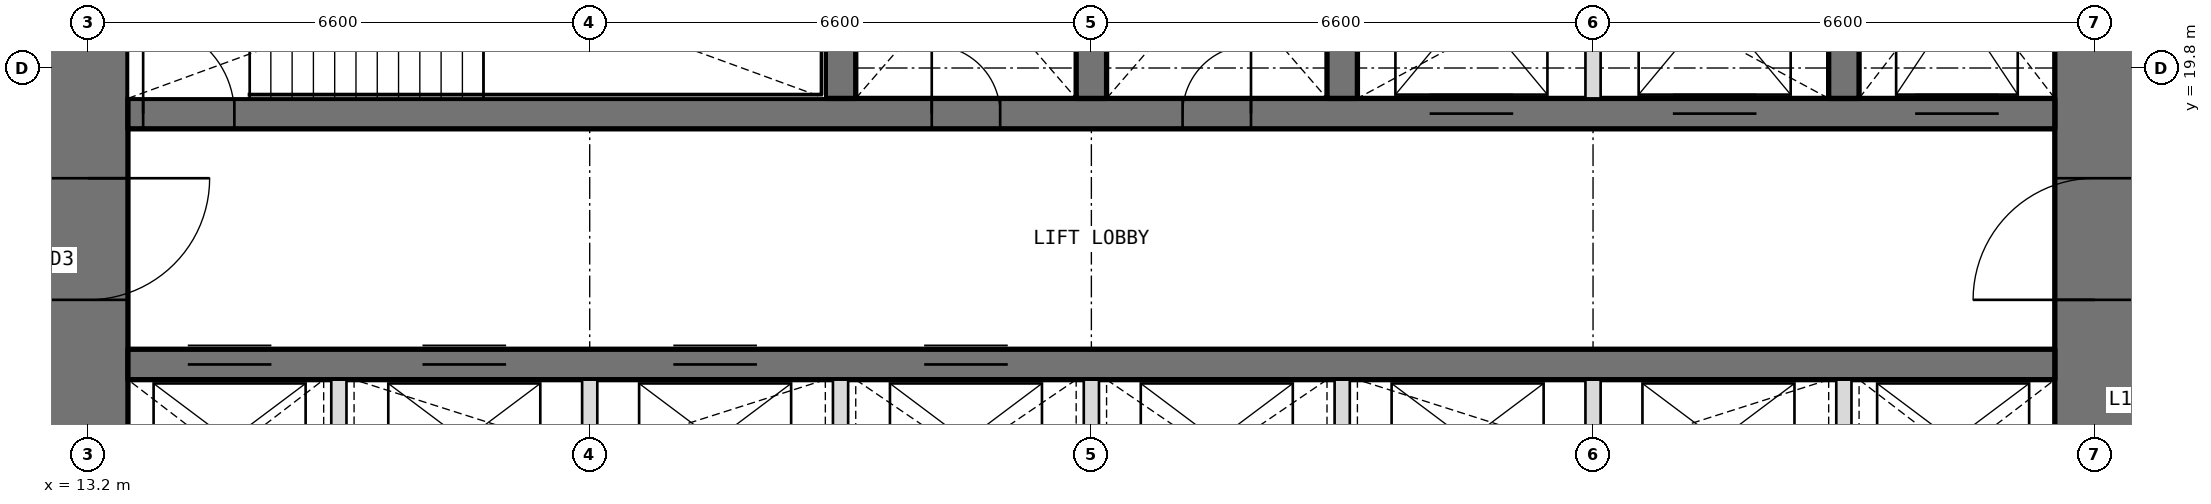
"""IFC4 building model, lengths in metres.
Left out: names, types, materials, properties, quantities, classifications, styles, units other than length and angle.
Written with IfcOpenShell. Run it as: python <this file> out.ifc"""

import sys

from ifc_helpers import new_model, si_unit, direction, frame, frame_2d, origin, place, context, subcontext, project, spatial, rectangle, extrude, element, fill, save


model = new_model("IFC4")
c1 = context("Model", 3, precision=1e-05, world=origin(), true_north=direction((0.0, 1.0)))
c2 = subcontext(c1, "Body", "Model", "MODEL_VIEW")
j1 = project(units=[si_unit("LENGTHUNIT", "METRE"), si_unit("PLANEANGLEUNIT", "RADIAN")], contexts=[c1])
p1 = place(None, origin())
s1 = spatial("IfcSite", under=j1, at=p1, CompositionType="ELEMENT")
p2 = place(p1, origin())
s2 = spatial("IfcBuilding", under=s1, at=p2, CompositionType="ELEMENT")
p3 = place(p2, frame((0.0, 0.0, 67.5)))
s3 = spatial("IfcBuildingStorey", under=s2, at=p3, CompositionType="ELEMENT", Elevation=67.5)
p4 = place(p3, frame((39.6, 13.725, 0.0), z_axis=(0.0, 0.0, 1.0), x_axis=(0.0, 1.0, 0.0)))
e1 = element("IfcWall", 1, at=p4, inside=s3, PredefinedType="SHEAR", context=c2, shape_type="SweptSolid", body=[
    extrude(rectangle(XDim=18.75, YDim=1.05, at=frame_2d((9.375, 0.0))), origin(), (0.0, 0.0, 1.0), 4.2),
])
p5 = place(p4, frame((3.025, 0.0, 0.0)))
e2 = element("IfcOpeningElement", 2, at=p5, cuts=e1, PredefinedType="OPENING", context=c2, shape_type="SweptSolid", body=[
    extrude(rectangle(XDim=1.6, YDim=2.1, at=frame_2d((0.8, 1.05))), frame((0.0, 0.535, 0.0), z_axis=(0.0, -1.0, 0.0), x_axis=(1.0, 0.0, 0.0)), (0.0, 0.0, 1.0), 1.07),
])
p6 = place(p4, frame((13.825, 0.0, 0.0)))
e3 = element("IfcOpeningElement", 3, at=p6, cuts=e1, PredefinedType="OPENING", context=c2, shape_type="SweptSolid", body=[
    extrude(rectangle(XDim=1.6, YDim=2.1, at=frame_2d((0.8, 1.05))), frame((0.0, 0.535, 0.0), z_axis=(0.0, -1.0, 0.0), x_axis=(1.0, 0.0, 0.0)), (0.0, 0.0, 1.0), 1.07),
])
p7 = place(p3, frame((13.2, 32.475, 0.0), z_axis=(0.0, 0.0, 1.0), x_axis=(0.0, -1.0, 0.0)))
e4 = element("IfcWall", 4, at=p7, inside=s3, PredefinedType="SHEAR", context=c2, shape_type="SweptSolid", body=[
    extrude(rectangle(XDim=18.75, YDim=1.05, at=frame_2d((9.375, 0.0))), origin(), (0.0, 0.0, 1.0), 4.2),
])
p8 = place(p7, frame((14.125, 0.0, 0.0)))
e5 = element("IfcOpeningElement", 5, at=p8, cuts=e4, PredefinedType="OPENING", context=c2, shape_type="SweptSolid", body=[
    extrude(rectangle(XDim=1.6, YDim=2.1, at=frame_2d((0.8, 1.05))), frame((0.0, 0.535, 0.0), z_axis=(0.0, -1.0, 0.0), x_axis=(1.0, 0.0, 0.0)), (0.0, 0.0, 1.0), 1.07),
])
p9 = place(p7, frame((3.325, 0.0, 0.0)))
e6 = element("IfcOpeningElement", 6, at=p9, cuts=e4, PredefinedType="OPENING", context=c2, shape_type="SweptSolid", body=[
    extrude(rectangle(XDim=1.6, YDim=2.1, at=frame_2d((0.8, 1.05))), frame((0.0, 0.535, 0.0), z_axis=(0.0, -1.0, 0.0), x_axis=(1.0, 0.0, 0.0)), (0.0, 0.0, 1.0), 1.07),
])
p10 = place(p3, frame((13.725, 15.9, 0.0), z_axis=(0.0, 0.0, 1.0), x_axis=(1.0, 0.0, 0.0)))
e7 = element("IfcWall", 7, at=p10, inside=s3, PredefinedType="SHEAR", context=c2, shape_type="SweptSolid", body=[
    extrude(rectangle(XDim=25.35, YDim=0.4, at=frame_2d((12.675, 0.0))), origin(), (0.0, 0.0, 1.0), 4.2),
])
p11 = place(p10, frame((0.788, 0.0, 0.0)))
e8 = element("IfcOpeningElement", 8, at=p11, cuts=e7, PredefinedType="OPENING", context=c2, shape_type="SweptSolid", body=[
    extrude(rectangle(XDim=1.1, YDim=2.1, at=frame_2d((0.55, 1.05))), frame((0.0, 0.21, 0.0), z_axis=(0.0, -1.0, 0.0), x_axis=(1.0, 0.0, 0.0)), (0.0, 0.0, 1.0), 0.42),
])
p12 = place(p10, frame((3.875, 0.0, 0.0)))
e9 = element("IfcOpeningElement", 9, at=p12, cuts=e7, PredefinedType="OPENING", context=c2, shape_type="SweptSolid", body=[
    extrude(rectangle(XDim=1.1, YDim=2.1, at=frame_2d((0.55, 1.05))), frame((0.0, 0.21, 0.0), z_axis=(0.0, -1.0, 0.0), x_axis=(1.0, 0.0, 0.0)), (0.0, 0.0, 1.0), 0.42),
])
p13 = place(p10, frame((7.175, 0.0, 0.0)))
e10 = element("IfcOpeningElement", 10, at=p13, cuts=e7, PredefinedType="OPENING", context=c2, shape_type="SweptSolid", body=[
    extrude(rectangle(XDim=1.1, YDim=2.1, at=frame_2d((0.55, 1.05))), frame((0.0, 0.21, 0.0), z_axis=(0.0, -1.0, 0.0), x_axis=(1.0, 0.0, 0.0)), (0.0, 0.0, 1.0), 0.42),
])
p14 = place(p10, frame((10.475, 0.0, 0.0)))
e11 = element("IfcOpeningElement", 11, at=p14, cuts=e7, PredefinedType="OPENING", context=c2, shape_type="SweptSolid", body=[
    extrude(rectangle(XDim=1.1, YDim=2.1, at=frame_2d((0.55, 1.05))), frame((0.0, 0.21, 0.0), z_axis=(0.0, -1.0, 0.0), x_axis=(1.0, 0.0, 0.0)), (0.0, 0.0, 1.0), 0.42),
])
p15 = place(p3, frame((13.725, 19.2, 0.0), z_axis=(0.0, 0.0, 1.0), x_axis=(1.0, 0.0, 0.0)))
e12 = element("IfcWall", 12, at=p15, inside=s3, PredefinedType="SHEAR", context=c2, shape_type="SweptSolid", body=[
    extrude(rectangle(XDim=25.35, YDim=0.4, at=frame_2d((12.675, 0.0))), origin(), (0.0, 0.0, 1.0), 4.2),
])
p16 = place(p15, frame((10.575, 0.0, 0.0)))
e13 = element("IfcOpeningElement", 13, at=p16, cuts=e12, PredefinedType="OPENING", context=c2, shape_type="SweptSolid", body=[
    extrude(rectangle(XDim=0.9, YDim=2.1, at=frame_2d((0.45, 1.05))), frame((0.0, 0.21, 0.0), z_axis=(0.0, -1.0, 0.0), x_axis=(1.0, 0.0, 0.0)), (0.0, 0.0, 1.0), 0.42),
])
p17 = place(p15, frame((13.875, 0.0, 0.0)))
e14 = element("IfcOpeningElement", 14, at=p17, cuts=e12, PredefinedType="OPENING", context=c2, shape_type="SweptSolid", body=[
    extrude(rectangle(XDim=0.9, YDim=2.1, at=frame_2d((0.45, 1.05))), frame((0.0, 0.21, 0.0), z_axis=(0.0, -1.0, 0.0), x_axis=(1.0, 0.0, 0.0)), (0.0, 0.0, 1.0), 0.42),
])
p18 = place(p15, frame((0.2, 0.0, 0.0)))
e15 = element("IfcOpeningElement", 15, at=p18, cuts=e12, PredefinedType="OPENING", context=c2, shape_type="SweptSolid", body=[
    extrude(rectangle(XDim=1.2, YDim=2.1, at=frame_2d((0.6, 1.05))), frame((0.0, 0.21, 0.0), z_axis=(0.0, -1.0, 0.0), x_axis=(1.0, 0.0, 0.0)), (0.0, 0.0, 1.0), 0.42),
])
p19 = place(p15, frame((23.512, 0.0, 0.0)))
e16 = element("IfcOpeningElement", 16, at=p19, cuts=e12, PredefinedType="OPENING", context=c2, shape_type="SweptSolid", body=[
    extrude(rectangle(XDim=1.1, YDim=2.1, at=frame_2d((0.55, 1.05))), frame((0.0, 0.21, 0.0), z_axis=(0.0, -1.0, 0.0), x_axis=(1.0, 0.0, 0.0)), (0.0, 0.0, 1.0), 0.42),
])
p20 = place(p15, frame((17.125, 0.0, 0.0)))
e17 = element("IfcOpeningElement", 17, at=p20, cuts=e12, PredefinedType="OPENING", context=c2, shape_type="SweptSolid", body=[
    extrude(rectangle(XDim=1.1, YDim=2.1, at=frame_2d((0.55, 1.05))), frame((0.0, 0.21, 0.0), z_axis=(0.0, -1.0, 0.0), x_axis=(1.0, 0.0, 0.0)), (0.0, 0.0, 1.0), 0.42),
])
p21 = place(p15, frame((20.325, 0.0, 0.0)))
e18 = element("IfcOpeningElement", 18, at=p21, cuts=e12, PredefinedType="OPENING", context=c2, shape_type="SweptSolid", body=[
    extrude(rectangle(XDim=1.1, YDim=2.1, at=frame_2d((0.55, 1.05))), frame((0.0, 0.21, 0.0), z_axis=(0.0, -1.0, 0.0), x_axis=(1.0, 0.0, 0.0)), (0.0, 0.0, 1.0), 0.42),
])
for number, where, z_axis, x_axis in (
    (19, (23.1, 19.4, 0.0), (0.0, 0.0, 1.0), (0.0, 1.0, 0.0)),
    (20, (26.4, 19.4, 0.0), (0.0, 0.0, 1.0), (0.0, 1.0, 0.0)),
    (21, (29.7, 19.4, 0.0), (0.0, 0.0, 1.0), (0.0, 1.0, 0.0)),
    (22, (36.3, 19.4, 0.0), (0.0, 0.0, 1.0), (0.0, 1.0, 0.0)),
):
    element("IfcWall", number, at=place(p3, frame(where, z_axis=z_axis, x_axis=x_axis)), inside=s3, PredefinedType="SHEAR", context=c2, shape_type="SweptSolid", body=[
        extrude(rectangle(XDim=3.35, YDim=0.4, at=frame_2d((1.675, 0.0))), origin(), (0.0, 0.0, 1.0), 4.2),
    ])
for number, where, z_axis, x_axis in (
    (23, (16.5, 13.725, 0.0), (0.0, 0.0, 1.0), (0.0, 1.0, 0.0)),
    (24, (19.8, 13.725, 0.0), (0.0, 0.0, 1.0), (0.0, 1.0, 0.0)),
    (25, (23.1, 13.725, 0.0), (0.0, 0.0, 1.0), (0.0, 1.0, 0.0)),
    (26, (26.4, 13.725, 0.0), (0.0, 0.0, 1.0), (0.0, 1.0, 0.0)),
    (27, (29.7, 13.725, 0.0), (0.0, 0.0, 1.0), (0.0, 1.0, 0.0)),
    (28, (33.0, 13.725, 0.0), (0.0, 0.0, 1.0), (0.0, 1.0, 0.0)),
    (29, (36.3, 13.725, 0.0), (0.0, 0.0, 1.0), (0.0, 1.0, 0.0)),
):
    element("IfcWall", number, at=place(p3, frame(where, z_axis=z_axis, x_axis=x_axis)), inside=s3, PredefinedType="PARTITIONING", context=c2, shape_type="SweptSolid", body=[
        extrude(rectangle(XDim=1.975, YDim=0.2, at=frame_2d((0.987, 0.0))), origin(), (0.0, 0.0, 1.0), 4.2),
    ])
p22 = place(p3, frame((33.0, 19.4, 0.0), z_axis=(0.0, 0.0, 1.0), x_axis=(0.0, 1.0, 0.0)))
e30 = element("IfcWall", 30, at=p22, inside=s3, PredefinedType="PARTITIONING", context=c2, shape_type="SweptSolid", body=[
    extrude(rectangle(XDim=3.35, YDim=0.2, at=frame_2d((1.675, 0.0))), origin(), (0.0, 0.0, 1.0), 4.2),
])
p23 = place(p16, origin())
e31 = element("IfcDoor", 31, at=p23, inside=s3, OperationType="SINGLE_SWING_LEFT", PredefinedType="DOOR", context=c2, shape_type="SweptSolid", body=[
    extrude(rectangle(XDim=0.9, YDim=2.1, at=frame_2d((0.45, 1.05))), frame((0.0, 0.025, 0.0), z_axis=(0.0, -1.0, 0.0), x_axis=(1.0, 0.0, 0.0)), (0.0, 0.0, 1.0), 0.05),
])
fill(e13, e31)
p24 = place(p17, origin())
e32 = element("IfcDoor", 32, at=p24, inside=s3, OperationType="SINGLE_SWING_RIGHT", PredefinedType="DOOR", context=c2, shape_type="SweptSolid", body=[
    extrude(rectangle(XDim=0.9, YDim=2.1, at=frame_2d((0.45, 1.05))), frame((0.0, 0.025, 0.0), z_axis=(0.0, -1.0, 0.0), x_axis=(1.0, 0.0, 0.0)), (0.0, 0.0, 1.0), 0.05),
])
fill(e14, e32)
p25 = place(p18, origin())
e33 = element("IfcDoor", 33, at=p25, inside=s3, OperationType="SINGLE_SWING_LEFT", PredefinedType="DOOR", context=c2, shape_type="SweptSolid", body=[
    extrude(rectangle(XDim=1.2, YDim=2.1, at=frame_2d((0.6, 1.05))), frame((0.0, 0.025, 0.0), z_axis=(0.0, -1.0, 0.0), x_axis=(1.0, 0.0, 0.0)), (0.0, 0.0, 1.0), 0.05),
])
fill(e15, e33)
p26 = place(p8, origin())
e34 = element("IfcDoor", 34, at=p26, inside=s3, OperationType="DOUBLE_DOOR_DOUBLE_SWING", PredefinedType="DOOR", context=c2, shape_type="SweptSolid", body=[
    extrude(rectangle(XDim=1.6, YDim=2.1, at=frame_2d((0.8, 1.05))), frame((0.0, 0.025, 0.0), z_axis=(0.0, -1.0, 0.0), x_axis=(1.0, 0.0, 0.0)), (0.0, 0.0, 1.0), 0.05),
])
fill(e5, e34)
p27 = place(p5, origin())
e35 = element("IfcDoor", 35, at=p27, inside=s3, OperationType="DOUBLE_DOOR_DOUBLE_SWING", PredefinedType="DOOR", context=c2, shape_type="SweptSolid", body=[
    extrude(rectangle(XDim=1.6, YDim=2.1, at=frame_2d((0.8, 1.05))), frame((0.0, 0.025, 0.0), z_axis=(0.0, -1.0, 0.0), x_axis=(1.0, 0.0, 0.0)), (0.0, 0.0, 1.0), 0.05),
])
fill(e2, e35)
p28 = place(p11, origin())
e36 = element("IfcDoor", 36, at=p28, inside=s3, OperationType="DOUBLE_DOOR_SLIDING", PredefinedType="DOOR", context=c2, shape_type="SweptSolid", body=[
    extrude(rectangle(XDim=1.1, YDim=2.1, at=frame_2d((0.55, 1.05))), frame((0.0, 0.025, 0.0), z_axis=(0.0, -1.0, 0.0), x_axis=(1.0, 0.0, 0.0)), (0.0, 0.0, 1.0), 0.05),
])
fill(e8, e36)
p29 = place(p12, origin())
e37 = element("IfcDoor", 37, at=p29, inside=s3, OperationType="DOUBLE_DOOR_SLIDING", PredefinedType="DOOR", context=c2, shape_type="SweptSolid", body=[
    extrude(rectangle(XDim=1.1, YDim=2.1, at=frame_2d((0.55, 1.05))), frame((0.0, 0.025, 0.0), z_axis=(0.0, -1.0, 0.0), x_axis=(1.0, 0.0, 0.0)), (0.0, 0.0, 1.0), 0.05),
])
fill(e9, e37)
p30 = place(p13, origin())
e38 = element("IfcDoor", 38, at=p30, inside=s3, OperationType="DOUBLE_DOOR_SLIDING", PredefinedType="DOOR", context=c2, shape_type="SweptSolid", body=[
    extrude(rectangle(XDim=1.1, YDim=2.1, at=frame_2d((0.55, 1.05))), frame((0.0, 0.025, 0.0), z_axis=(0.0, -1.0, 0.0), x_axis=(1.0, 0.0, 0.0)), (0.0, 0.0, 1.0), 0.05),
])
fill(e10, e38)
p31 = place(p14, origin())
e39 = element("IfcDoor", 39, at=p31, inside=s3, OperationType="DOUBLE_DOOR_SLIDING", PredefinedType="DOOR", context=c2, shape_type="SweptSolid", body=[
    extrude(rectangle(XDim=1.1, YDim=2.1, at=frame_2d((0.55, 1.05))), frame((0.0, 0.025, 0.0), z_axis=(0.0, -1.0, 0.0), x_axis=(1.0, 0.0, 0.0)), (0.0, 0.0, 1.0), 0.05),
])
fill(e11, e39)
p32 = place(p19, origin())
e40 = element("IfcDoor", 40, at=p32, inside=s3, OperationType="DOUBLE_DOOR_SLIDING", PredefinedType="DOOR", context=c2, shape_type="SweptSolid", body=[
    extrude(rectangle(XDim=1.1, YDim=2.1, at=frame_2d((0.55, 1.05))), frame((0.0, 0.025, 0.0), z_axis=(0.0, -1.0, 0.0), x_axis=(1.0, 0.0, 0.0)), (0.0, 0.0, 1.0), 0.05),
])
fill(e16, e40)
p33 = place(p20, origin())
e41 = element("IfcDoor", 41, at=p33, inside=s3, OperationType="DOUBLE_DOOR_SLIDING", PredefinedType="DOOR", context=c2, shape_type="SweptSolid", body=[
    extrude(rectangle(XDim=1.1, YDim=2.1, at=frame_2d((0.55, 1.05))), frame((0.0, 0.025, 0.0), z_axis=(0.0, -1.0, 0.0), x_axis=(1.0, 0.0, 0.0)), (0.0, 0.0, 1.0), 0.05),
])
fill(e17, e41)
p34 = place(p21, origin())
e42 = element("IfcDoor", 42, at=p34, inside=s3, OperationType="DOUBLE_DOOR_SLIDING", PredefinedType="DOOR", context=c2, shape_type="SweptSolid", body=[
    extrude(rectangle(XDim=1.1, YDim=2.1, at=frame_2d((0.55, 1.05))), frame((0.0, 0.025, 0.0), z_axis=(0.0, -1.0, 0.0), x_axis=(1.0, 0.0, 0.0)), (0.0, 0.0, 1.0), 0.05),
])
fill(e18, e42)
save(model, sys.argv[1])
